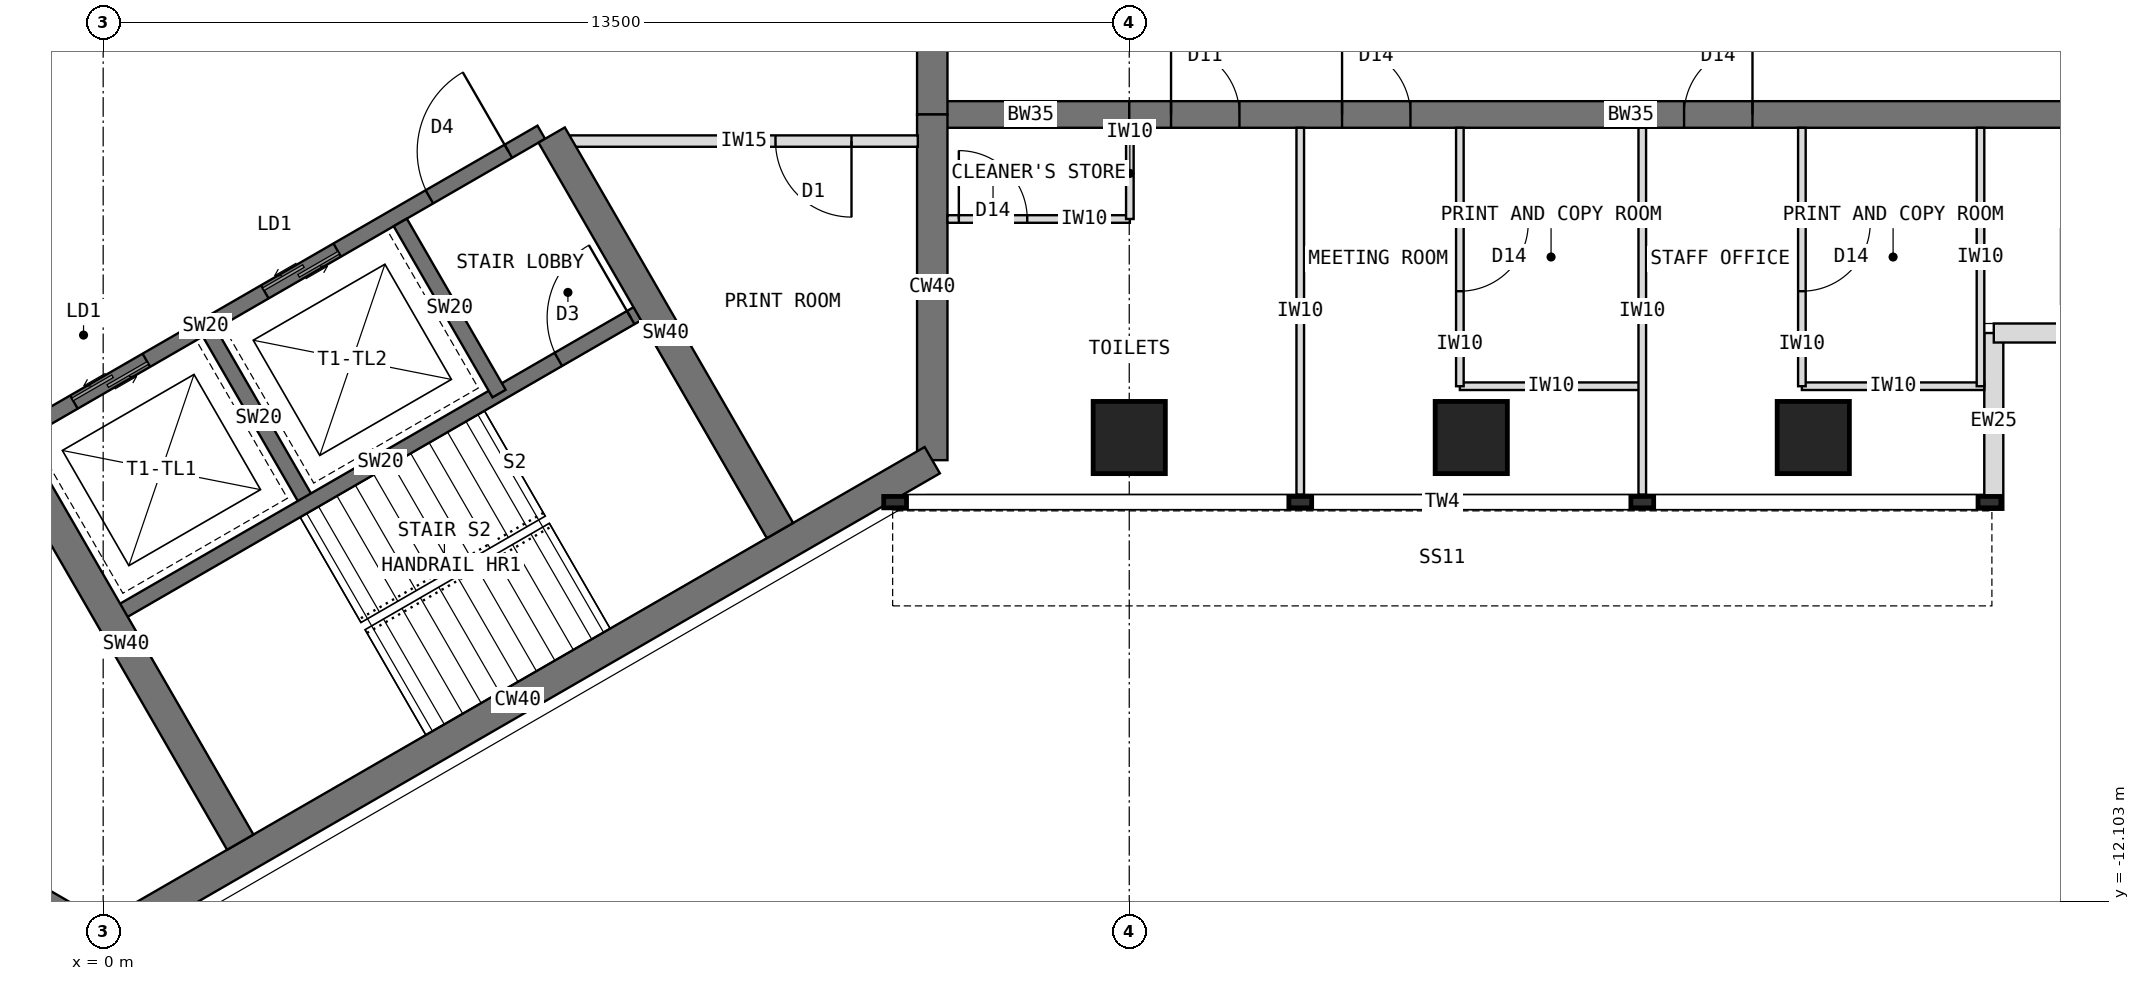
"""IFC4 building model, lengths in metres.
Left out: names, types, materials, properties, quantities, classifications, styles, units other than length and angle.
Written with IfcOpenShell. Run it as: python <this file> out.ifc"""

import sys

from ifc_helpers import new_model, si_unit, direction, frame, frame_2d, origin, origin_2d, place, context, subcontext, project, spatial, rectangle, extrude, element, fill, save


model = new_model("IFC4")
c1 = context("Model", 3, precision=1e-05, world=origin(), true_north=direction((0.0, 1.0)))
c2 = subcontext(c1, "Body", "Model", "MODEL_VIEW")
j1 = project(units=[si_unit("LENGTHUNIT", "METRE"), si_unit("PLANEANGLEUNIT", "RADIAN")], contexts=[c1])
p1 = place(None, origin())
s1 = spatial("IfcSite", under=j1, at=p1, CompositionType="ELEMENT")
p2 = place(p1, origin())
s2 = spatial("IfcBuilding", under=s1, at=p2, CompositionType="ELEMENT")
p3 = place(p2, frame((0.0, 0.0, 287.5)))
s3 = spatial("IfcBuildingStorey", under=s2, at=p3, CompositionType="ELEMENT", Elevation=287.5)
p4 = place(p3, frame((10.908, -6.298, 0.0), z_axis=(0.0, 0.0, 1.0), x_axis=(0.0, 1.0, 0.0)))
e1 = element("IfcWall", 1, at=p4, inside=s3, PredefinedType="SHEAR", context=c2, shape_type="SweptSolid", body=[
    extrude(rectangle(XDim=4.548, YDim=0.4, at=frame_2d((2.274, 0.0))), origin(), (0.0, 0.0, 1.0), 4.0),
])
p5 = place(p3, frame((10.908, -1.75, 0.0), z_axis=(0.0, 0.0, 1.0), x_axis=(0.0, 1.0, 0.0)))
e2 = element("IfcWall", 2, at=p5, inside=s3, PredefinedType="SHEAR", context=c2, shape_type="SweptSolid", body=[
    extrude(rectangle(XDim=3.5, YDim=0.4, at=frame_2d((1.75, 0.0))), origin(), (0.0, 0.0, 1.0), 4.0),
])
p6 = place(p5, frame((0.85, 0.0, 0.0)))
e3 = element("IfcOpeningElement", 3, at=p6, cuts=e2, PredefinedType="OPENING", context=c2, shape_type="SweptSolid", body=[
    extrude(rectangle(XDim=1.8, YDim=2.1, at=frame_2d((0.9, 1.05))), frame((0.0, 0.21, 0.0), z_axis=(0.0, -1.0, 0.0), x_axis=(1.0, 0.0, 0.0)), (0.0, 0.0, 1.0), 0.42),
])
p7 = place(p3, frame((-3.939, -10.322, 0.0), z_axis=(0.0, 0.0, 1.0), x_axis=(0.866011268655, -0.500024481964, 0.0)))
e4 = element("IfcWall", 4, at=p7, inside=s3, PredefinedType="SHEAR", context=c2, shape_type="SweptSolid", body=[
    extrude(rectangle(XDim=4.548, YDim=0.4, at=frame_2d((2.274, 0.0))), origin(), (0.0, 0.0, 1.0), 4.0),
])
p8 = place(p3, frame((0.0, -12.596, 0.0), z_axis=(0.0, 0.0, 1.0), x_axis=(0.866021940709, 0.500005998175, 0.0)))
e5 = element("IfcWall", 5, at=p8, inside=s3, PredefinedType="SHEAR", context=c2, shape_type="SweptSolid", body=[
    extrude(rectangle(XDim=12.596, YDim=0.4, at=frame_2d((6.298, 0.0))), origin(), (0.0, 0.0, 1.0), 4.0),
])
p9 = place(p3, frame((10.908, -1.75, 0.0), z_axis=(0.0, 0.0, 1.0), x_axis=(1.0, 0.0, 0.0)))
e6 = element("IfcWall", 6, at=p9, inside=s3, PredefinedType="SHEAR", context=c2, shape_type="SweptSolid", body=[
    extrude(rectangle(XDim=2.592, YDim=0.35, at=frame_2d((1.296, 0.0))), origin(), (0.0, 0.0, 1.0), 4.0),
])
p10 = place(p3, frame((13.5, -1.75, 0.0), z_axis=(0.0, 0.0, 1.0), x_axis=(1.0, 0.0, 0.0)))
e7 = element("IfcWall", 7, at=p10, inside=s3, PredefinedType="SHEAR", context=c2, shape_type="SweptSolid", body=[
    extrude(rectangle(XDim=13.2, YDim=0.35, at=frame_2d((6.6, 0.0))), origin(), (0.0, 0.0, 1.0), 4.0),
])
p11 = place(p10, frame((0.55, 0.0, 0.0)))
e8 = element("IfcOpeningElement", 8, at=p11, cuts=e7, PredefinedType="OPENING", context=c2, shape_type="SweptSolid", body=[
    extrude(rectangle(XDim=0.9, YDim=2.1, at=frame_2d((0.45, 1.05))), frame((0.0, 0.185, 0.0), z_axis=(0.0, -1.0, 0.0), x_axis=(1.0, 0.0, 0.0)), (0.0, 0.0, 1.0), 0.37),
])
p12 = place(p10, frame((2.8, 0.0, 0.0)))
e9 = element("IfcOpeningElement", 9, at=p12, cuts=e7, PredefinedType="OPENING", context=c2, shape_type="SweptSolid", body=[
    extrude(rectangle(XDim=0.9, YDim=2.1, at=frame_2d((0.45, 1.05))), frame((0.0, 0.185, 0.0), z_axis=(0.0, -1.0, 0.0), x_axis=(1.0, 0.0, 0.0)), (0.0, 0.0, 1.0), 0.37),
])
p13 = place(p10, frame((7.3, 0.0, 0.0)))
e10 = element("IfcOpeningElement", 10, at=p13, cuts=e7, PredefinedType="OPENING", context=c2, shape_type="SweptSolid", body=[
    extrude(rectangle(XDim=0.9, YDim=2.1, at=frame_2d((0.45, 1.05))), frame((0.0, 0.185, 0.0), z_axis=(0.0, -1.0, 0.0), x_axis=(1.0, 0.0, 0.0)), (0.0, 0.0, 1.0), 0.37),
])
for number, where, z_axis, x_axis in (
    (11, (13.5, -6.0, 0.0), (0.0, 0.0, 1.0), (1.0, 0.0, 0.0)),
    (12, (18.0, -6.0, 0.0), (0.0, 0.0, 1.0), (1.0, 0.0, 0.0)),
    (13, (22.5, -6.0, 0.0), (0.0, 0.0, 1.0), (1.0, 0.0, 0.0)),
):
    element("IfcColumn", number, at=place(p3, frame(where, z_axis=z_axis, x_axis=x_axis)), inside=s3, PredefinedType="COLUMN", context=c2, shape_type="SweptSolid", body=[
        extrude(rectangle(XDim=0.95, YDim=0.95, at=origin_2d()), origin(), (0.0, 0.0, 1.0), 4.0),
    ])
for number, where, z_axis, x_axis in (
    (14, (24.875, -6.95, 0.0), (0.0, 0.0, 1.0), (0.0, 1.0, 0.0)),
    (15, (24.875, -4.625, 0.0), (0.0, 0.0, 1.0), (1.0, 0.0, 0.0)),
):
    element("IfcWall", number, at=place(p3, frame(where, z_axis=z_axis, x_axis=x_axis)), inside=s3, PredefinedType="STANDARD", context=c2, shape_type="SweptSolid", body=[
        extrude(rectangle(XDim=2.325, YDim=0.25, at=frame_2d((1.163, 0.0))), origin(), (0.0, 0.0, 1.0), 3.7),
    ])
p14 = place(p3, frame((-1.164, -5.984, 0.0), z_axis=(0.0, 0.0, 1.0), x_axis=(0.866026010844, 0.49999894854, 0.0)))
e16 = element("IfcWall", 16, at=p14, inside=s3, PredefinedType="SHEAR", context=c2, shape_type="SweptSolid", body=[
    extrude(rectangle(XDim=8.0, YDim=0.2, at=frame_2d((4.0, 0.0))), origin(), (0.0, 0.0, 1.0), 4.0),
])
p15 = place(p14, frame((6.3, 0.0, 0.0)))
e17 = element("IfcOpeningElement", 17, at=p15, cuts=e16, PredefinedType="OPENING", context=c2, shape_type="SweptSolid", body=[
    extrude(rectangle(XDim=1.2, YDim=2.1, at=frame_2d((0.6, 1.05))), frame((0.0, 0.11, 0.0), z_axis=(0.0, -1.0, 0.0), x_axis=(1.0, 0.0, 0.0)), (0.0, 0.0, 1.0), 0.22),
])
p16 = place(p14, frame((0.9, 0.0, 0.0)))
e18 = element("IfcOpeningElement", 18, at=p16, cuts=e16, PredefinedType="OPENING", context=c2, shape_type="SweptSolid", body=[
    extrude(rectangle(XDim=1.1, YDim=2.2, at=frame_2d((0.55, 1.1))), frame((0.0, 0.11, 0.0), z_axis=(0.0, -1.0, 0.0), x_axis=(1.0, 0.0, 0.0)), (0.0, 0.0, 1.0), 0.22),
])
p17 = place(p14, frame((3.8, 0.0, 0.0)))
e19 = element("IfcOpeningElement", 19, at=p17, cuts=e16, PredefinedType="OPENING", context=c2, shape_type="SweptSolid", body=[
    extrude(rectangle(XDim=1.1, YDim=2.2, at=frame_2d((0.55, 1.1))), frame((0.0, 0.11, 0.0), z_axis=(0.0, -1.0, 0.0), x_axis=(1.0, 0.0, 0.0)), (0.0, 0.0, 1.0), 0.22),
])
p18 = place(p3, frame((1.397, -4.62, 0.0), z_axis=(0.0, 0.0, 1.0), x_axis=(0.499936506574, -0.866062058628, 0.0)))
e20 = element("IfcWall", 20, at=p18, inside=s3, PredefinedType="SHEAR", context=c2, shape_type="SweptSolid", body=[
    extrude(rectangle(XDim=2.6, YDim=0.2, at=frame_2d((1.3, 0.0))), origin(), (0.0, 0.0, 1.0), 4.0),
])
p19 = place(p3, frame((3.909, -3.17, 0.0), z_axis=(0.0, 0.0, 1.0), x_axis=(0.49997716683, -0.86603858612, 0.0)))
e21 = element("IfcWall", 21, at=p19, inside=s3, PredefinedType="SHEAR", context=c2, shape_type="SweptSolid", body=[
    extrude(rectangle(XDim=2.6, YDim=0.2, at=frame_2d((1.3, 0.0))), origin(), (0.0, 0.0, 1.0), 4.0),
])
p20 = place(p3, frame((0.186, -8.322, 0.0), z_axis=(0.0, 0.0, 1.0), x_axis=(0.866026010844, 0.49999894854, 0.0)))
e22 = element("IfcWall", 22, at=p20, inside=s3, PredefinedType="SHEAR", context=c2, shape_type="SweptSolid", body=[
    extrude(rectangle(XDim=8.0, YDim=0.2, at=frame_2d((4.0, 0.0))), origin(), (0.0, 0.0, 1.0), 4.0),
])
p21 = place(p20, frame((6.7, 0.0, 0.0)))
e23 = element("IfcOpeningElement", 23, at=p21, cuts=e22, PredefinedType="OPENING", context=c2, shape_type="SweptSolid", body=[
    extrude(rectangle(XDim=1.1, YDim=2.1, at=frame_2d((0.55, 1.05))), frame((0.0, 0.11, 0.0), z_axis=(0.0, -1.0, 0.0), x_axis=(1.0, 0.0, 0.0)), (0.0, 0.0, 1.0), 0.22),
])
for number, where, z_axis, x_axis in (
    (24, (5.901, -2.02, 0.0), (0.0, 0.0, 1.0), (0.5, -0.866, 0.0)),
    (25, (-1.201, -6.12, 0.0), (0.0, 0.0, 1.0), (0.5, -0.866, 0.0)),
):
    element("IfcWall", number, at=place(p3, frame(where, z_axis=z_axis, x_axis=x_axis)), inside=s3, PredefinedType="SHEAR", context=c2, shape_type="SweptSolid", body=[
        extrude(rectangle(XDim=6.008, YDim=0.4, at=frame_2d((3.004, 0.0))), origin(), (0.0, 0.0, 1.0), 4.0),
    ])
for number, where, z_axis, x_axis in (
    (26, (15.75, -1.925, 0.0), (0.0, 0.0, 1.0), (0.0, -1.0, 0.0)),
    (27, (20.25, -1.925, 0.0), (0.0, 0.0, 1.0), (0.0, -1.0, 0.0)),
):
    element("IfcWall", number, at=place(p3, frame(where, z_axis=z_axis, x_axis=x_axis)), inside=s3, PredefinedType="PARTITIONING", context=c2, shape_type="SweptSolid", body=[
        extrude(rectangle(XDim=4.825, YDim=0.1, at=frame_2d((2.413, 0.0))), origin(), (0.0, 0.0, 1.0), 3.7),
    ])
p22 = place(p3, frame((17.85, -5.325, 0.0), z_axis=(0.0, 0.0, 1.0), x_axis=(1.0, 0.0, 0.0)))
e28 = element("IfcWall", 28, at=p22, inside=s3, PredefinedType="PARTITIONING", context=c2, shape_type="SweptSolid", body=[
    extrude(rectangle(XDim=2.4, YDim=0.1, at=frame_2d((1.2, 0.0))), origin(), (0.0, 0.0, 1.0), 3.7),
])
p23 = place(p3, frame((17.85, -1.925, 0.0), z_axis=(0.0, 0.0, 1.0), x_axis=(0.0, -1.0, 0.0)))
e29 = element("IfcWall", 29, at=p23, inside=s3, PredefinedType="PARTITIONING", context=c2, shape_type="SweptSolid", body=[
    extrude(rectangle(XDim=3.4, YDim=0.1, at=frame_2d((1.7, 0.0))), origin(), (0.0, 0.0, 1.0), 3.7),
])
p24 = place(p23, frame((1.25, 0.0, 0.0)))
e30 = element("IfcOpeningElement", 30, at=p24, cuts=e29, PredefinedType="OPENING", context=c2, shape_type="SweptSolid", body=[
    extrude(rectangle(XDim=0.9, YDim=2.1, at=frame_2d((0.45, 1.05))), frame((0.0, 0.06, 0.0), z_axis=(0.0, -1.0, 0.0), x_axis=(1.0, 0.0, 0.0)), (0.0, 0.0, 1.0), 0.12),
])
p25 = place(p3, frame((22.35, -5.325, 0.0), z_axis=(0.0, 0.0, 1.0), x_axis=(1.0, 0.0, 0.0)))
e31 = element("IfcWall", 31, at=p25, inside=s3, PredefinedType="PARTITIONING", context=c2, shape_type="SweptSolid", body=[
    extrude(rectangle(XDim=2.4, YDim=0.1, at=frame_2d((1.2, 0.0))), origin(), (0.0, 0.0, 1.0), 3.7),
])
p26 = place(p3, frame((22.35, -1.925, 0.0), z_axis=(0.0, 0.0, 1.0), x_axis=(0.0, -1.0, 0.0)))
e32 = element("IfcWall", 32, at=p26, inside=s3, PredefinedType="PARTITIONING", context=c2, shape_type="SweptSolid", body=[
    extrude(rectangle(XDim=3.4, YDim=0.1, at=frame_2d((1.7, 0.0))), origin(), (0.0, 0.0, 1.0), 3.7),
])
p27 = place(p26, frame((1.25, 0.0, 0.0)))
e33 = element("IfcOpeningElement", 33, at=p27, cuts=e32, PredefinedType="OPENING", context=c2, shape_type="SweptSolid", body=[
    extrude(rectangle(XDim=0.9, YDim=2.1, at=frame_2d((0.45, 1.05))), frame((0.0, 0.06, 0.0), z_axis=(0.0, -1.0, 0.0), x_axis=(1.0, 0.0, 0.0)), (0.0, 0.0, 1.0), 0.12),
])
p28 = place(p3, frame((24.7, -1.925, 0.0), z_axis=(0.0, 0.0, 1.0), x_axis=(0.0, -1.0, 0.0)))
e34 = element("IfcWall", 34, at=p28, inside=s3, PredefinedType="PARTITIONING", context=c2, shape_type="SweptSolid", body=[
    extrude(rectangle(XDim=3.4, YDim=0.1, at=frame_2d((1.7, 0.0))), origin(), (0.0, 0.0, 1.0), 3.7),
])
p29 = place(p3, frame((11.108, -3.125, 0.0), z_axis=(0.0, 0.0, 1.0), x_axis=(1.0, 0.0, 0.0)))
e35 = element("IfcWall", 35, at=p29, inside=s3, PredefinedType="PARTITIONING", context=c2, shape_type="SweptSolid", body=[
    extrude(rectangle(XDim=2.4, YDim=0.1, at=frame_2d((1.2, 0.0))), origin(), (0.0, 0.0, 1.0), 3.7),
])
p30 = place(p29, frame((0.15, 0.0, 0.0)))
e36 = element("IfcOpeningElement", 36, at=p30, cuts=e35, PredefinedType="OPENING", context=c2, shape_type="SweptSolid", body=[
    extrude(rectangle(XDim=0.9, YDim=2.1, at=frame_2d((0.45, 1.05))), frame((0.0, 0.06, 0.0), z_axis=(0.0, -1.0, 0.0), x_axis=(1.0, 0.0, 0.0)), (0.0, 0.0, 1.0), 0.12),
])
p31 = place(p3, frame((13.508, -1.925, 0.0), z_axis=(0.0, 0.0, 1.0), x_axis=(0.0, -1.0, 0.0)))
e37 = element("IfcWall", 37, at=p31, inside=s3, PredefinedType="PARTITIONING", context=c2, shape_type="SweptSolid", body=[
    extrude(rectangle(XDim=1.2, YDim=0.1, at=frame_2d((0.6, 0.0))), origin(), (0.0, 0.0, 1.0), 3.167),
])
p32 = place(p3, frame((10.718, -2.1, 0.0), z_axis=(0.0, 0.0, 1.0), x_axis=(-1.0, 0.0, 0.0)))
e38 = element("IfcWall", 38, at=p32, inside=s3, PredefinedType="PARTITIONING", context=c2, shape_type="SweptSolid", body=[
    extrude(rectangle(XDim=4.576, YDim=0.15, at=frame_2d((2.288, 0.0))), origin(), (0.0, 0.0, 1.0), 3.7),
])
p33 = place(p32, frame((0.873, 0.0, 0.0)))
e39 = element("IfcOpeningElement", 39, at=p33, cuts=e38, PredefinedType="OPENING", context=c2, shape_type="SweptSolid", body=[
    extrude(rectangle(XDim=1.0, YDim=2.1, at=frame_2d((0.5, 1.05))), frame((0.0, 0.085, 0.0), z_axis=(0.0, -1.0, 0.0), x_axis=(1.0, 0.0, 0.0)), (0.0, 0.0, 1.0), 0.17),
])
p34 = place(p15, origin())
e40 = element("IfcDoor", 40, at=p34, inside=s3, OperationType="SINGLE_SWING_RIGHT", PredefinedType="DOOR", context=c2, shape_type="SweptSolid", body=[
    extrude(rectangle(XDim=1.2, YDim=2.1, at=frame_2d((0.6, 1.05))), frame((0.0, 0.025, 0.0), z_axis=(0.0, -1.0, 0.0), x_axis=(1.0, 0.0, 0.0)), (0.0, 0.0, 1.0), 0.05),
])
fill(e17, e40)
p35 = place(p16, origin())
e41 = element("IfcDoor", 41, at=p35, inside=s3, OperationType="DOUBLE_DOOR_SLIDING", PredefinedType="DOOR", context=c2, shape_type="SweptSolid", body=[
    extrude(rectangle(XDim=1.1, YDim=2.2, at=frame_2d((0.55, 1.1))), frame((0.0, 0.025, 0.0), z_axis=(0.0, -1.0, 0.0), x_axis=(1.0, 0.0, 0.0)), (0.0, 0.0, 1.0), 0.05),
])
fill(e18, e41)
p36 = place(p17, origin())
e42 = element("IfcDoor", 42, at=p36, inside=s3, OperationType="DOUBLE_DOOR_SLIDING", PredefinedType="DOOR", context=c2, shape_type="SweptSolid", body=[
    extrude(rectangle(XDim=1.1, YDim=2.2, at=frame_2d((0.55, 1.1))), frame((0.0, 0.025, 0.0), z_axis=(0.0, -1.0, 0.0), x_axis=(1.0, 0.0, 0.0)), (0.0, 0.0, 1.0), 0.05),
])
fill(e19, e42)
p37 = place(p21, origin())
e43 = element("IfcDoor", 43, at=p37, inside=s3, OperationType="SINGLE_SWING_RIGHT", PredefinedType="DOOR", context=c2, shape_type="SweptSolid", body=[
    extrude(rectangle(XDim=1.1, YDim=2.1, at=frame_2d((0.55, 1.05))), frame((0.0, 0.025, 0.0), z_axis=(0.0, -1.0, 0.0), x_axis=(1.0, 0.0, 0.0)), (0.0, 0.0, 1.0), 0.05),
])
fill(e23, e43)
p38 = place(p24, origin())
e44 = element("IfcDoor", 44, at=p38, inside=s3, OperationType="SINGLE_SWING_LEFT", PredefinedType="DOOR", context=c2, shape_type="SweptSolid", body=[
    extrude(rectangle(XDim=0.9, YDim=2.1, at=frame_2d((0.45, 1.05))), frame((0.0, 0.025, 0.0), z_axis=(0.0, -1.0, 0.0), x_axis=(1.0, 0.0, 0.0)), (0.0, 0.0, 1.0), 0.05),
])
fill(e30, e44)
p39 = place(p27, origin())
e45 = element("IfcDoor", 45, at=p39, inside=s3, OperationType="SINGLE_SWING_LEFT", PredefinedType="DOOR", context=c2, shape_type="SweptSolid", body=[
    extrude(rectangle(XDim=0.9, YDim=2.1, at=frame_2d((0.45, 1.05))), frame((0.0, 0.025, 0.0), z_axis=(0.0, -1.0, 0.0), x_axis=(1.0, 0.0, 0.0)), (0.0, 0.0, 1.0), 0.05),
])
fill(e33, e45)
p40 = place(p30, origin())
e46 = element("IfcDoor", 46, at=p40, inside=s3, OperationType="SINGLE_SWING_LEFT", PredefinedType="DOOR", context=c2, shape_type="SweptSolid", body=[
    extrude(rectangle(XDim=0.9, YDim=2.1, at=frame_2d((0.45, 1.05))), frame((0.0, 0.025, 0.0), z_axis=(0.0, -1.0, 0.0), x_axis=(1.0, 0.0, 0.0)), (0.0, 0.0, 1.0), 0.05),
])
fill(e36, e46)
p41 = place(p33, origin())
e47 = element("IfcDoor", 47, at=p41, inside=s3, OperationType="SINGLE_SWING_LEFT", PredefinedType="DOOR", context=c2, shape_type="SweptSolid", body=[
    extrude(rectangle(XDim=1.0, YDim=2.1, at=frame_2d((0.5, 1.05))), frame((0.0, 0.025, 0.0), z_axis=(0.0, -1.0, 0.0), x_axis=(1.0, 0.0, 0.0)), (0.0, 0.0, 1.0), 0.05),
])
fill(e39, e47)
p42 = place(p11, origin())
e48 = element("IfcDoor", 48, at=p42, inside=s3, OperationType="SINGLE_SWING_LEFT", PredefinedType="DOOR", context=c2, shape_type="SweptSolid", body=[
    extrude(rectangle(XDim=0.9, YDim=2.1, at=frame_2d((0.45, 1.05))), frame((0.0, 0.025, 0.0), z_axis=(0.0, -1.0, 0.0), x_axis=(1.0, 0.0, 0.0)), (0.0, 0.0, 1.0), 0.05),
])
fill(e8, e48)
p43 = place(p12, origin())
e49 = element("IfcDoor", 49, at=p43, inside=s3, OperationType="SINGLE_SWING_LEFT", PredefinedType="DOOR", context=c2, shape_type="SweptSolid", body=[
    extrude(rectangle(XDim=0.9, YDim=2.1, at=frame_2d((0.45, 1.05))), frame((0.0, 0.025, 0.0), z_axis=(0.0, -1.0, 0.0), x_axis=(1.0, 0.0, 0.0)), (0.0, 0.0, 1.0), 0.05),
])
fill(e9, e49)
p44 = place(p13, origin())
e50 = element("IfcDoor", 50, at=p44, inside=s3, OperationType="SINGLE_SWING_RIGHT", PredefinedType="DOOR", context=c2, shape_type="SweptSolid", body=[
    extrude(rectangle(XDim=0.9, YDim=2.1, at=frame_2d((0.45, 1.05))), frame((0.0, 0.025, 0.0), z_axis=(0.0, -1.0, 0.0), x_axis=(1.0, 0.0, 0.0)), (0.0, 0.0, 1.0), 0.05),
])
fill(e10, e50)
save(model, sys.argv[1])
